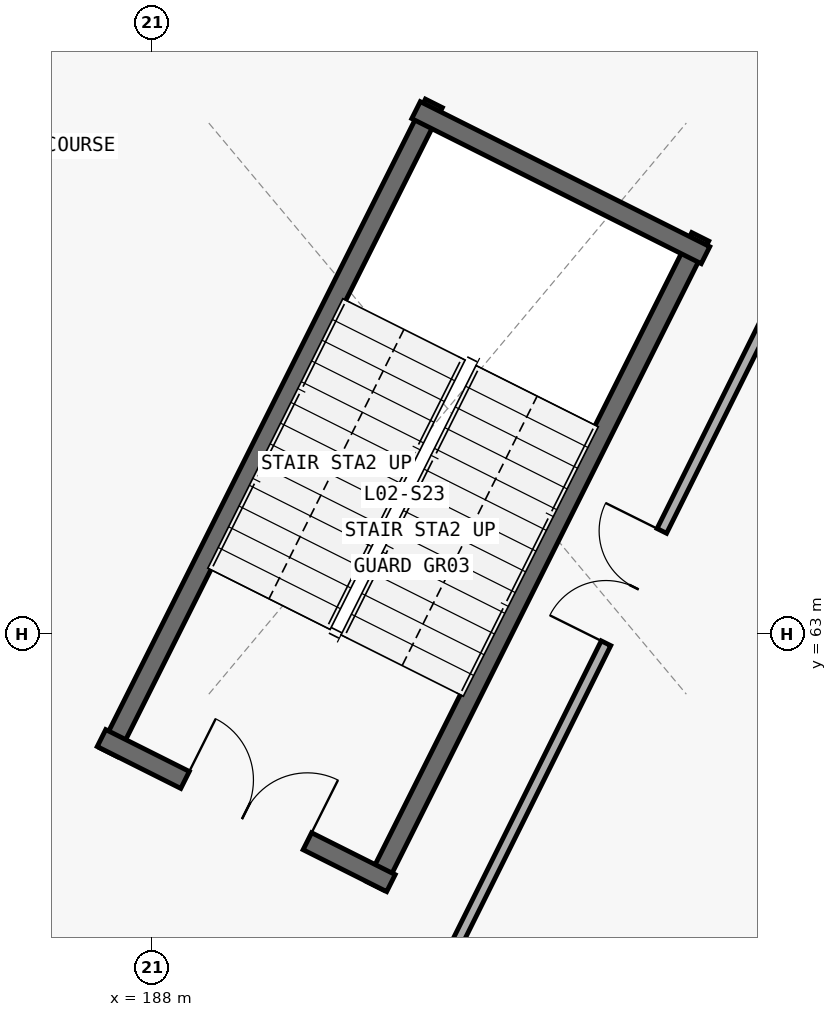
"""IFC4 building model, lengths in metres.
Left out: names, types, materials, properties, quantities, classifications, styles, units other than length and angle.
Written with IfcOpenShell. Run it as: python <this file> out.ifc"""

import sys

from ifc_helpers import new_model, si_unit, direction, frame, frame_2d, origin, place, context, subcontext, project, spatial, rectangle, extrude, element, fill, save


model = new_model("IFC4")
c1 = context("Model", 3, precision=1e-05, world=origin(), true_north=direction((0.0, 1.0)))
c2 = subcontext(c1, "Body", "Model", "MODEL_VIEW")
j1 = project(units=[si_unit("LENGTHUNIT", "METRE"), si_unit("PLANEANGLEUNIT", "RADIAN")], contexts=[c1])
p1 = place(None, origin())
s1 = spatial("IfcSite", under=j1, at=p1, CompositionType="ELEMENT")
p2 = place(p1, origin())
s2 = spatial("IfcBuilding", under=s1, at=p2, CompositionType="ELEMENT")
p3 = place(p2, frame((0.0, 0.0, 10.2)))
s3 = spatial("IfcBuildingStorey", under=s2, at=p3, CompositionType="ELEMENT", Elevation=10.2)
p4 = place(p3, frame((190.937, 59.687, 0.0), z_axis=(0.0, 0.0, 1.0), x_axis=(0.447919041961, 0.894074119885, 0.0)))
e1 = element("IfcWall", 1, at=p4, inside=s3, PredefinedType="SHEAR", context=c2, shape_type="SweptSolid", body=[
    extrude(rectangle(XDim=9.55, YDim=0.25, at=frame_2d((4.775, 0.0))), origin(), (0.0, 0.0, 1.0), 4.5),
])
p5 = place(p3, frame((191.709, 69.981, 0.0), z_axis=(0.0, 0.0, 1.0), x_axis=(-0.4479088042, -0.894079248792, 0.0)))
e2 = element("IfcWall", 2, at=p5, inside=s3, PredefinedType="SHEAR", context=c2, shape_type="SweptSolid", body=[
    extrude(rectangle(XDim=9.55, YDim=0.25, at=frame_2d((4.775, 0.0))), origin(), (0.0, 0.0, 1.0), 4.5),
])
p6 = place(p3, frame((187.336, 61.63, 0.0), z_axis=(0.0, 0.0, 1.0), x_axis=(0.894071595331, -0.447924081092, 0.0)))
e3 = element("IfcWall", 3, at=p6, inside=s3, PredefinedType="SHEAR", context=c2, shape_type="SweptSolid", body=[
    extrude(rectangle(XDim=4.26, YDim=0.25, at=frame_2d((2.13, 0.0))), origin(), (0.0, 0.0, 1.0), 4.5),
])
p7 = place(p6, frame((1.23, 0.0, 0.0)))
e4 = element("IfcOpeningElement", 4, at=p7, cuts=e3, PredefinedType="OPENING", context=c2, shape_type="SweptSolid", body=[
    extrude(rectangle(XDim=1.8, YDim=2.25, at=frame_2d((0.9, 1.125))), frame((0.0, 0.135, 0.0), z_axis=(0.0, -1.0, 0.0), x_axis=(1.0, 0.0, 0.0)), (0.0, 0.0, 1.0), 0.27),
])
p8 = place(p3, frame((195.283, 67.984, 0.0), z_axis=(0.0, 0.0, 1.0), x_axis=(-0.894083048484, 0.447901219481, 0.0)))
e5 = element("IfcWall", 5, at=p8, inside=s3, PredefinedType="SHEAR", context=c2, shape_type="SweptSolid", body=[
    extrude(rectangle(XDim=4.26, YDim=0.25, at=frame_2d((2.13, 0.0))), origin(), (0.0, 0.0, 1.0), 4.5),
])
p9 = place(p3, frame((190.066, 55.018, 0.0), z_axis=(0.0, 0.0, 1.0), x_axis=(0.445193759993, 0.895434261162, 0.0)))
e6 = element("IfcWall", 6, at=p9, inside=s3, PredefinedType="PARTITIONING", context=c2, shape_type="SweptSolid", body=[
    extrude(rectangle(XDim=19.205, YDim=0.14, at=frame_2d((9.603, 0.0))), origin(), (0.0, 0.0, 1.0), 3.565),
])
p10 = place(p9, frame((8.778, 0.0, 0.0)))
e7 = element("IfcOpeningElement", 7, at=p10, cuts=e6, PredefinedType="OPENING", context=c2, shape_type="SweptSolid", body=[
    extrude(rectangle(XDim=1.65, YDim=2.25, at=frame_2d((0.825, 1.125))), frame((0.0, 0.08, 0.0), z_axis=(0.0, -1.0, 0.0), x_axis=(1.0, 0.0, 0.0)), (0.0, 0.0, 1.0), 0.16),
])
p11 = place(p7, origin())
e8 = element("IfcDoor", 8, at=p11, inside=s3, OperationType="DOUBLE_DOOR_SINGLE_SWING", PredefinedType="DOOR", context=c2, shape_type="SweptSolid", body=[
    extrude(rectangle(XDim=1.8, YDim=2.25, at=frame_2d((0.9, 1.125))), frame((0.0, 0.025, 0.0), z_axis=(0.0, -1.0, 0.0), x_axis=(1.0, 0.0, 0.0)), (0.0, 0.0, 1.0), 0.05),
])
fill(e4, e8)
p12 = place(p10, origin())
e9 = element("IfcDoor", 9, at=p12, inside=s3, OperationType="DOUBLE_DOOR_SINGLE_SWING", PredefinedType="DOOR", context=c2, shape_type="SweptSolid", body=[
    extrude(rectangle(XDim=1.65, YDim=2.25, at=frame_2d((0.825, 1.125))), frame((0.0, 0.025, 0.0), z_axis=(0.0, -1.0, 0.0), x_axis=(1.0, 0.0, 0.0)), (0.0, 0.0, 1.0), 0.05),
])
fill(e7, e9)
save(model, sys.argv[1])
